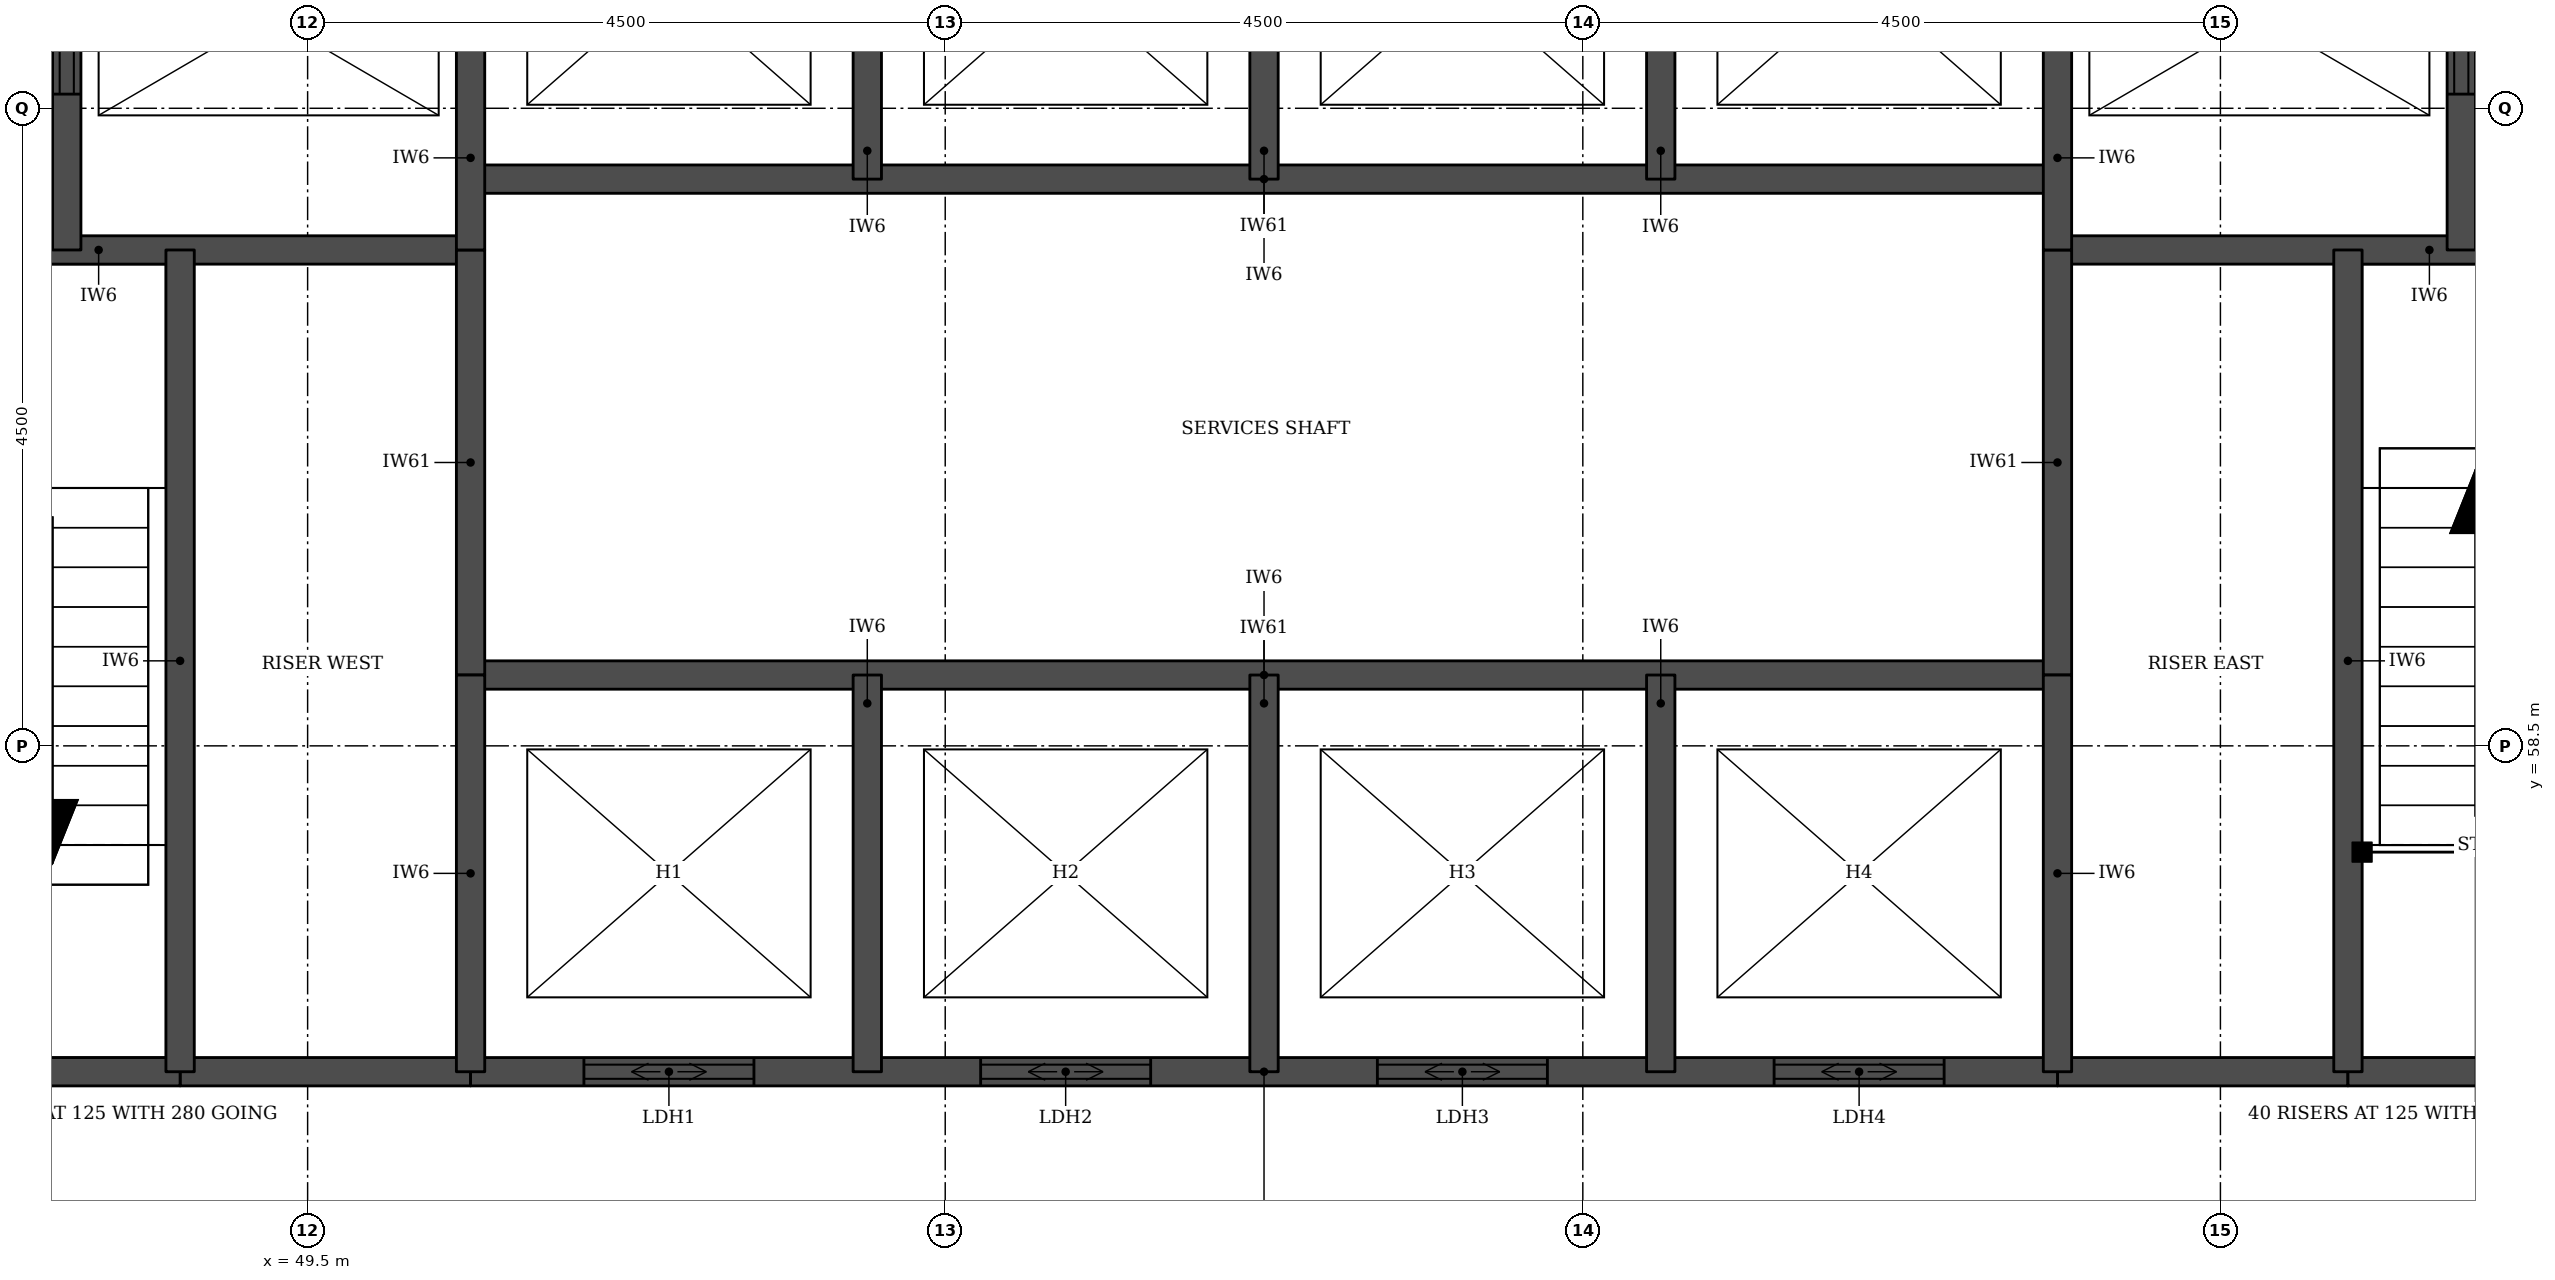
"""IFC4 building model, lengths in metres.
Left out: names, types, materials, properties, quantities, classifications, styles, units other than length and angle.
Written with IfcOpenShell. Run it as: python <this file> out.ifc"""

import sys

from ifc_helpers import new_model, si_unit, direction, frame, frame_2d, origin, place, context, subcontext, project, spatial, rectangle, extrude, element, fill, save


model = new_model("IFC4")
c1 = context("Model", 3, precision=1e-05, world=origin(), true_north=direction((0.0, 1.0)))
c2 = subcontext(c1, "Body", "Model", "MODEL_VIEW")
j1 = project(units=[si_unit("LENGTHUNIT", "METRE"), si_unit("PLANEANGLEUNIT", "RADIAN")], contexts=[c1])
p1 = place(None, origin())
s1 = spatial("IfcSite", under=j1, at=p1, CompositionType="ELEMENT")
p2 = place(p1, origin())
s2 = spatial("IfcBuilding", under=s1, at=p2, CompositionType="ELEMENT")
p3 = place(p2, frame((0.0, 0.0, 206.9)))
s3 = spatial("IfcBuildingStorey", under=s2, at=p3, CompositionType="ELEMENT", Elevation=206.9)
for number, where, z_axis, x_axis in (
    (1, (48.6, 56.2, 0.0), (0.0, 0.0, 1.0), (1.0, 0.0, 0.0)),
    (2, (61.85, 56.2, 0.0), (0.0, 0.0, 1.0), (1.0, 0.0, 0.0)),
):
    element("IfcWall", number, at=place(p3, frame(where, z_axis=z_axis, x_axis=x_axis)), inside=s3, PredefinedType="SOLIDWALL", context=c2, shape_type="SweptSolid", body=[
        extrude(rectangle(XDim=2.05, YDim=0.2, at=frame_2d((1.025, 0.0))), origin(), (0.0, 0.0, 1.0), 4.85),
    ])
p4 = place(p3, frame((45.4, 56.2, 0.0), z_axis=(0.0, 0.0, 1.0), x_axis=(1.0, 0.0, 0.0)))
e3 = element("IfcWall", 3, at=p4, inside=s3, PredefinedType="SOLIDWALL", context=c2, shape_type="SweptSolid", body=[
    extrude(rectangle(XDim=3.2, YDim=0.2, at=frame_2d((1.6, 0.0))), origin(), (0.0, 0.0, 1.0), 4.85),
])
p5 = place(p3, frame((50.65, 56.2, 0.0), z_axis=(0.0, 0.0, 1.0), x_axis=(1.0, 0.0, 0.0)))
e4 = element("IfcWall", 4, at=p5, inside=s3, PredefinedType="SOLIDWALL", context=c2, shape_type="SweptSolid", body=[
    extrude(rectangle(XDim=11.2, YDim=0.2, at=frame_2d((5.6, 0.0))), origin(), (0.0, 0.0, 1.0), 4.85),
])
p6 = place(p5, frame((0.8, 0.0, 0.0)))
e5 = element("IfcOpeningElement", 5, at=p6, cuts=e4, PredefinedType="OPENING", context=c2, shape_type="SweptSolid", body=[
    extrude(rectangle(XDim=1.2, YDim=2.1, at=frame_2d((0.6, 1.05))), frame((0.0, 0.11, 0.0), z_axis=(0.0, -1.0, 0.0), x_axis=(1.0, 0.0, 0.0)), (0.0, 0.0, 1.0), 0.22),
])
p7 = place(p5, frame((3.6, 0.0, 0.0)))
e6 = element("IfcOpeningElement", 6, at=p7, cuts=e4, PredefinedType="OPENING", context=c2, shape_type="SweptSolid", body=[
    extrude(rectangle(XDim=1.2, YDim=2.1, at=frame_2d((0.6, 1.05))), frame((0.0, 0.11, 0.0), z_axis=(0.0, -1.0, 0.0), x_axis=(1.0, 0.0, 0.0)), (0.0, 0.0, 1.0), 0.22),
])
p8 = place(p5, frame((6.4, 0.0, 0.0)))
e7 = element("IfcOpeningElement", 7, at=p8, cuts=e4, PredefinedType="OPENING", context=c2, shape_type="SweptSolid", body=[
    extrude(rectangle(XDim=1.2, YDim=2.1, at=frame_2d((0.6, 1.05))), frame((0.0, 0.11, 0.0), z_axis=(0.0, -1.0, 0.0), x_axis=(1.0, 0.0, 0.0)), (0.0, 0.0, 1.0), 0.22),
])
p9 = place(p5, frame((9.2, 0.0, 0.0)))
e8 = element("IfcOpeningElement", 8, at=p9, cuts=e4, PredefinedType="OPENING", context=c2, shape_type="SweptSolid", body=[
    extrude(rectangle(XDim=1.2, YDim=2.1, at=frame_2d((0.6, 1.05))), frame((0.0, 0.11, 0.0), z_axis=(0.0, -1.0, 0.0), x_axis=(1.0, 0.0, 0.0)), (0.0, 0.0, 1.0), 0.22),
])
p10 = place(p3, frame((63.9, 56.2, 0.0), z_axis=(0.0, 0.0, 1.0), x_axis=(1.0, 0.0, 0.0)))
e9 = element("IfcWall", 9, at=p10, inside=s3, PredefinedType="SOLIDWALL", context=c2, shape_type="SweptSolid", body=[
    extrude(rectangle(XDim=3.2, YDim=0.2, at=frame_2d((1.6, 0.0))), origin(), (0.0, 0.0, 1.0), 4.85),
])
p11 = place(p3, frame((50.65, 59.0, 0.0), z_axis=(0.0, 0.0, 1.0), x_axis=(1.0, 0.0, 0.0)))
e10 = element("IfcWall", 10, at=p11, inside=s3, PredefinedType="SOLIDWALL", context=c2, shape_type="SweptSolid", body=[
    extrude(rectangle(XDim=11.2, YDim=0.2, at=frame_2d((5.6, 0.0))), origin(), (0.0, 0.0, 1.0), 5.0),
])
for number, where, z_axis, x_axis in (
    (11, (45.4, 62.0, 0.0), (0.0, 0.0, 1.0), (1.0, 0.0, 0.0)),
    (12, (61.85, 62.0, 0.0), (0.0, 0.0, 1.0), (1.0, 0.0, 0.0)),
):
    element("IfcWall", number, at=place(p3, frame(where, z_axis=z_axis, x_axis=x_axis)), inside=s3, PredefinedType="SOLIDWALL", context=c2, shape_type="SweptSolid", body=[
        extrude(rectangle(XDim=5.25, YDim=0.2, at=frame_2d((2.625, 0.0))), origin(), (0.0, 0.0, 1.0), 4.85),
    ])
p12 = place(p3, frame((50.65, 62.5, 0.0), z_axis=(0.0, 0.0, 1.0), x_axis=(1.0, 0.0, 0.0)))
e13 = element("IfcWall", 13, at=p12, inside=s3, PredefinedType="SOLIDWALL", context=c2, shape_type="SweptSolid", body=[
    extrude(rectangle(XDim=11.2, YDim=0.2, at=frame_2d((5.6, 0.0))), origin(), (0.0, 0.0, 1.0), 5.0),
])
p13 = place(p3, frame((47.8, 62.0, 0.0), z_axis=(0.0, 0.0, 1.0), x_axis=(0.0, 1.0, 0.0)))
e14 = element("IfcWall", 14, at=p13, inside=s3, PredefinedType="SOLIDWALL", context=c2, shape_type="SweptSolid", body=[
    extrude(rectangle(XDim=3.3, YDim=0.2, at=frame_2d((1.65, 0.0))), origin(), (0.0, 0.0, 1.0), 4.85),
])
p14 = place(p13, frame((1.1, 0.0, 0.0)))
e15 = element("IfcOpeningElement", 15, at=p14, cuts=e14, PredefinedType="OPENING", context=c2, shape_type="SweptSolid", body=[
    extrude(rectangle(XDim=1.1, YDim=2.1, at=frame_2d((0.55, 1.05))), frame((0.0, 0.11, 0.0), z_axis=(0.0, -1.0, 0.0), x_axis=(1.0, 0.0, 0.0)), (0.0, 0.0, 1.0), 0.22),
])
p15 = place(p3, frame((48.6, 56.2, 0.0), z_axis=(0.0, 0.0, 1.0), x_axis=(0.0, 1.0, 0.0)))
e16 = element("IfcWall", 16, at=p15, inside=s3, PredefinedType="SOLIDWALL", context=c2, shape_type="SweptSolid", body=[
    extrude(rectangle(XDim=5.8, YDim=0.2, at=frame_2d((2.9, 0.0))), origin(), (0.0, 0.0, 1.0), 4.85),
])
p16 = place(p3, frame((50.65, 59.0, 0.0), z_axis=(0.0, 0.0, 1.0), x_axis=(0.0, 1.0, 0.0)))
e17 = element("IfcWall", 17, at=p16, inside=s3, PredefinedType="SOLIDWALL", context=c2, shape_type="SweptSolid", body=[
    extrude(rectangle(XDim=3.0, YDim=0.2, at=frame_2d((1.5, 0.0))), origin(), (0.0, 0.0, 1.0), 5.0),
])
p17 = place(p3, frame((50.65, 56.2, 0.0), z_axis=(0.0, 0.0, 1.0), x_axis=(0.0, 1.0, 0.0)))
e18 = element("IfcWall", 18, at=p17, inside=s3, PredefinedType="SOLIDWALL", context=c2, shape_type="SweptSolid", body=[
    extrude(rectangle(XDim=2.8, YDim=0.2, at=frame_2d((1.4, 0.0))), origin(), (0.0, 0.0, 1.0), 4.85),
])
p18 = place(p3, frame((50.65, 62.0, 0.0), z_axis=(0.0, 0.0, 1.0), x_axis=(0.0, 1.0, 0.0)))
e19 = element("IfcWall", 19, at=p18, inside=s3, PredefinedType="SOLIDWALL", context=c2, shape_type="SweptSolid", body=[
    extrude(rectangle(XDim=3.3, YDim=0.2, at=frame_2d((1.65, 0.0))), origin(), (0.0, 0.0, 1.0), 4.85),
])
for number, where, z_axis, x_axis in (
    (20, (53.45, 56.2, 0.0), (0.0, 0.0, 1.0), (0.0, 1.0, 0.0)),
    (21, (53.45, 62.5, 0.0), (0.0, 0.0, 1.0), (0.0, 1.0, 0.0)),
    (22, (56.25, 56.2, 0.0), (0.0, 0.0, 1.0), (0.0, 1.0, 0.0)),
    (23, (56.25, 62.5, 0.0), (0.0, 0.0, 1.0), (0.0, 1.0, 0.0)),
    (24, (59.05, 56.2, 0.0), (0.0, 0.0, 1.0), (0.0, 1.0, 0.0)),
    (25, (59.05, 62.5, 0.0), (0.0, 0.0, 1.0), (0.0, 1.0, 0.0)),
):
    element("IfcWall", number, at=place(p3, frame(where, z_axis=z_axis, x_axis=x_axis)), inside=s3, PredefinedType="SOLIDWALL", context=c2, shape_type="SweptSolid", body=[
        extrude(rectangle(XDim=2.8, YDim=0.2, at=frame_2d((1.4, 0.0))), origin(), (0.0, 0.0, 1.0), 4.85),
    ])
p19 = place(p3, frame((61.85, 59.0, 0.0), z_axis=(0.0, 0.0, 1.0), x_axis=(0.0, 1.0, 0.0)))
e26 = element("IfcWall", 26, at=p19, inside=s3, PredefinedType="SOLIDWALL", context=c2, shape_type="SweptSolid", body=[
    extrude(rectangle(XDim=3.0, YDim=0.2, at=frame_2d((1.5, 0.0))), origin(), (0.0, 0.0, 1.0), 5.0),
])
p20 = place(p3, frame((61.85, 56.2, 0.0), z_axis=(0.0, 0.0, 1.0), x_axis=(0.0, 1.0, 0.0)))
e27 = element("IfcWall", 27, at=p20, inside=s3, PredefinedType="SOLIDWALL", context=c2, shape_type="SweptSolid", body=[
    extrude(rectangle(XDim=2.8, YDim=0.2, at=frame_2d((1.4, 0.0))), origin(), (0.0, 0.0, 1.0), 4.85),
])
p21 = place(p3, frame((61.85, 62.0, 0.0), z_axis=(0.0, 0.0, 1.0), x_axis=(0.0, 1.0, 0.0)))
e28 = element("IfcWall", 28, at=p21, inside=s3, PredefinedType="SOLIDWALL", context=c2, shape_type="SweptSolid", body=[
    extrude(rectangle(XDim=3.3, YDim=0.2, at=frame_2d((1.65, 0.0))), origin(), (0.0, 0.0, 1.0), 4.85),
])
p22 = place(p3, frame((63.9, 56.2, 0.0), z_axis=(0.0, 0.0, 1.0), x_axis=(0.0, 1.0, 0.0)))
e29 = element("IfcWall", 29, at=p22, inside=s3, PredefinedType="SOLIDWALL", context=c2, shape_type="SweptSolid", body=[
    extrude(rectangle(XDim=5.8, YDim=0.2, at=frame_2d((2.9, 0.0))), origin(), (0.0, 0.0, 1.0), 4.85),
])
p23 = place(p3, frame((64.7, 62.0, 0.0), z_axis=(0.0, 0.0, 1.0), x_axis=(0.0, 1.0, 0.0)))
e30 = element("IfcWall", 30, at=p23, inside=s3, PredefinedType="SOLIDWALL", context=c2, shape_type="SweptSolid", body=[
    extrude(rectangle(XDim=3.3, YDim=0.2, at=frame_2d((1.65, 0.0))), origin(), (0.0, 0.0, 1.0), 4.85),
])
p24 = place(p23, frame((1.1, 0.0, 0.0)))
e31 = element("IfcOpeningElement", 31, at=p24, cuts=e30, PredefinedType="OPENING", context=c2, shape_type="SweptSolid", body=[
    extrude(rectangle(XDim=1.1, YDim=2.1, at=frame_2d((0.55, 1.05))), frame((0.0, 0.11, 0.0), z_axis=(0.0, -1.0, 0.0), x_axis=(1.0, 0.0, 0.0)), (0.0, 0.0, 1.0), 0.22),
])
p25 = place(p6, origin())
e32 = element("IfcDoor", 32, at=p25, inside=s3, OperationType="DOUBLE_DOOR_SLIDING", PredefinedType="DOOR", context=c2, shape_type="SweptSolid", body=[
    extrude(rectangle(XDim=1.2, YDim=2.1, at=frame_2d((0.6, 1.05))), frame((0.0, 0.025, 0.0), z_axis=(0.0, -1.0, 0.0), x_axis=(1.0, 0.0, 0.0)), (0.0, 0.0, 1.0), 0.05),
])
fill(e5, e32)
p26 = place(p7, origin())
e33 = element("IfcDoor", 33, at=p26, inside=s3, OperationType="DOUBLE_DOOR_SLIDING", PredefinedType="DOOR", context=c2, shape_type="SweptSolid", body=[
    extrude(rectangle(XDim=1.2, YDim=2.1, at=frame_2d((0.6, 1.05))), frame((0.0, 0.025, 0.0), z_axis=(0.0, -1.0, 0.0), x_axis=(1.0, 0.0, 0.0)), (0.0, 0.0, 1.0), 0.05),
])
fill(e6, e33)
p27 = place(p8, origin())
e34 = element("IfcDoor", 34, at=p27, inside=s3, OperationType="DOUBLE_DOOR_SLIDING", PredefinedType="DOOR", context=c2, shape_type="SweptSolid", body=[
    extrude(rectangle(XDim=1.2, YDim=2.1, at=frame_2d((0.6, 1.05))), frame((0.0, 0.025, 0.0), z_axis=(0.0, -1.0, 0.0), x_axis=(1.0, 0.0, 0.0)), (0.0, 0.0, 1.0), 0.05),
])
fill(e7, e34)
p28 = place(p9, origin())
e35 = element("IfcDoor", 35, at=p28, inside=s3, OperationType="DOUBLE_DOOR_SLIDING", PredefinedType="DOOR", context=c2, shape_type="SweptSolid", body=[
    extrude(rectangle(XDim=1.2, YDim=2.1, at=frame_2d((0.6, 1.05))), frame((0.0, 0.025, 0.0), z_axis=(0.0, -1.0, 0.0), x_axis=(1.0, 0.0, 0.0)), (0.0, 0.0, 1.0), 0.05),
])
fill(e8, e35)
p29 = place(p14, origin())
e36 = element("IfcDoor", 36, at=p29, inside=s3, OperationType="DOUBLE_DOOR_SLIDING", PredefinedType="DOOR", context=c2, shape_type="SweptSolid", body=[
    extrude(rectangle(XDim=1.1, YDim=2.1, at=frame_2d((0.55, 1.05))), frame((0.0, 0.025, 0.0), z_axis=(0.0, -1.0, 0.0), x_axis=(1.0, 0.0, 0.0)), (0.0, 0.0, 1.0), 0.05),
])
fill(e15, e36)
p30 = place(p24, origin())
e37 = element("IfcDoor", 37, at=p30, inside=s3, OperationType="DOUBLE_DOOR_SLIDING", PredefinedType="DOOR", context=c2, shape_type="SweptSolid", body=[
    extrude(rectangle(XDim=1.1, YDim=2.1, at=frame_2d((0.55, 1.05))), frame((0.0, 0.025, 0.0), z_axis=(0.0, -1.0, 0.0), x_axis=(1.0, 0.0, 0.0)), (0.0, 0.0, 1.0), 0.05),
])
fill(e31, e37)
save(model, sys.argv[1])
